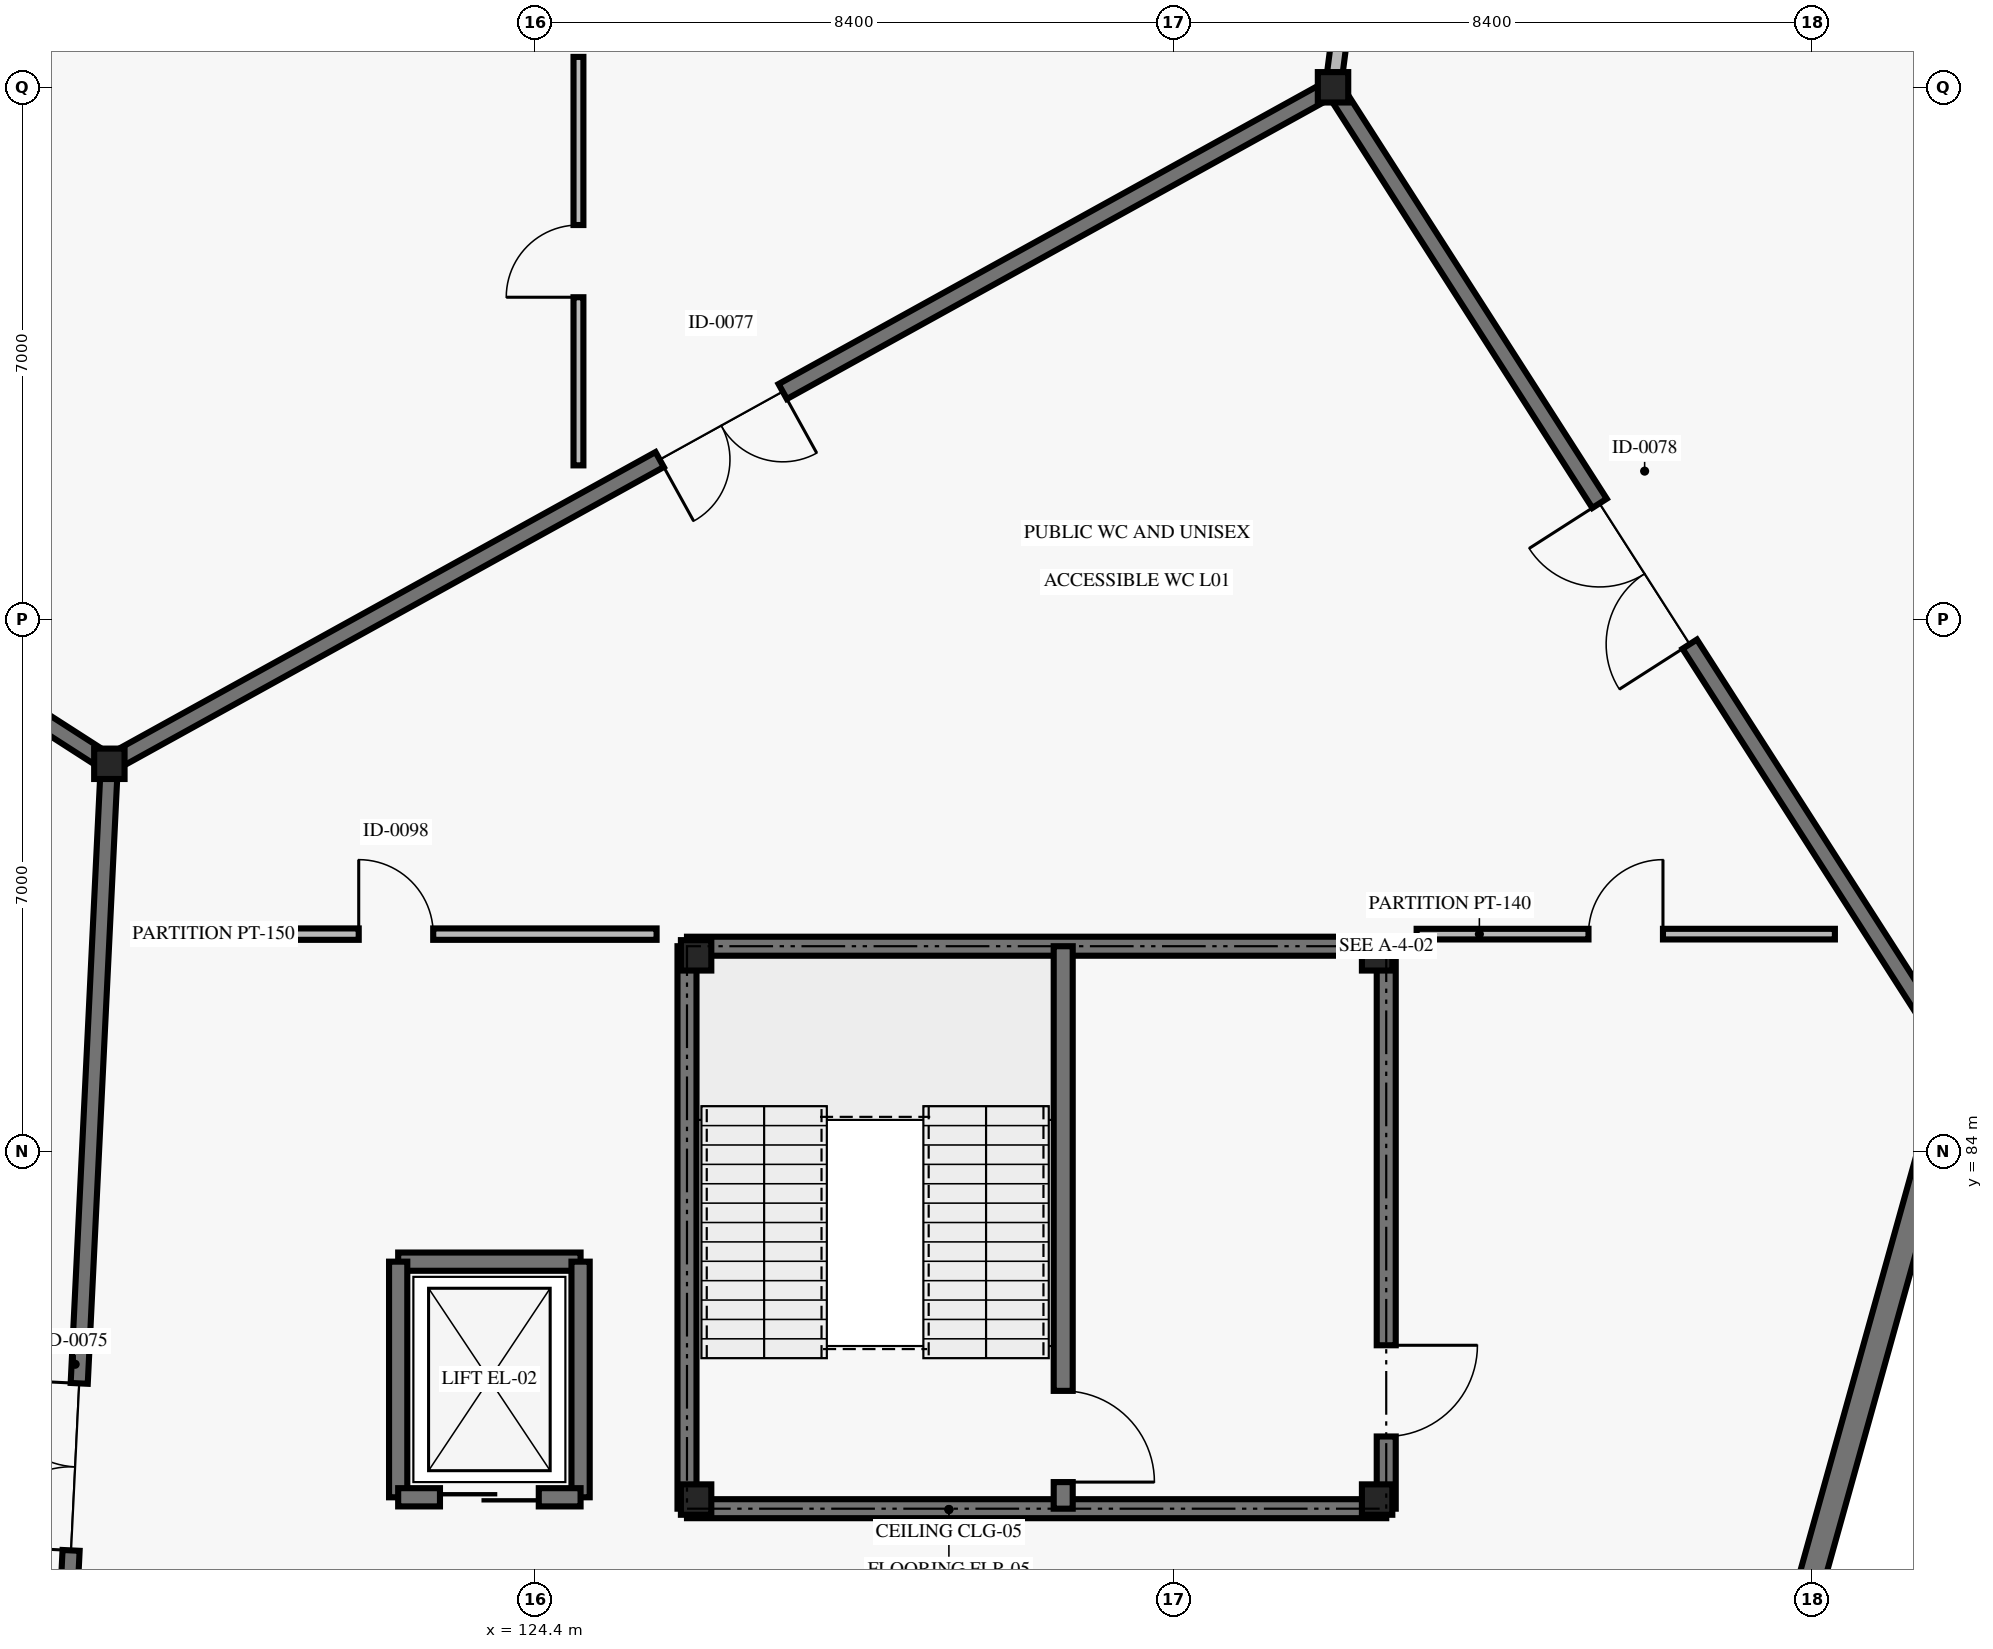
"""IFC4 building model, lengths in metres.
Left out: names, types, materials, properties, quantities, classifications, styles, units other than length and angle.
Written with IfcOpenShell. Run it as: python <this file> out.ifc"""

import sys

from ifc_helpers import new_model, si_unit, direction, frame, frame_2d, origin, origin_2d, place, context, subcontext, project, spatial, rectangle, i_section, extrude, element, fill, save


model = new_model("IFC4")
c1 = context("Model", 3, precision=1e-05, world=origin(), true_north=direction((0.0, 1.0)))
c2 = subcontext(c1, "Body", "Model", "MODEL_VIEW")
j1 = project(units=[si_unit("LENGTHUNIT", "METRE"), si_unit("PLANEANGLEUNIT", "RADIAN")], contexts=[c1])
p1 = place(None, origin())
s1 = spatial("IfcSite", under=j1, at=p1, CompositionType="ELEMENT")
p2 = place(p1, origin())
s2 = spatial("IfcBuilding", under=s1, at=p2, CompositionType="ELEMENT")
p3 = place(p2, frame((0.0, 0.0, 5.4)))
s3 = spatial("IfcBuildingStorey", under=s2, at=p3, CompositionType="ELEMENT", Elevation=5.4)
for number, where, z_axis, x_axis in (
    (1, (118.8, 89.1, 0.0), (0.0, 0.0, 1.0), (1.0, 0.0, 0.0)),
    (2, (134.9, 98.0, 0.0), (0.0, 0.0, 1.0), (1.0, 0.0, 0.0)),
    (3, (126.52, 79.42, 0.0), (0.0, 0.0, 1.0), (1.0, 0.0, 0.0)),
    (4, (135.48, 79.42, 0.0), (0.0, 0.0, 1.0), (1.0, 0.0, 0.0)),
    (5, (135.48, 86.58, 0.0), (0.0, 0.0, 1.0), (1.0, 0.0, 0.0)),
    (6, (126.52, 86.58, 0.0), (0.0, 0.0, 1.0), (1.0, 0.0, 0.0)),
):
    element("IfcColumn", number, at=place(p3, frame(where, z_axis=z_axis, x_axis=x_axis)), inside=s3, PredefinedType="COLUMN", context=c2, shape_type="SweptSolid", body=[
        extrude(i_section(OverallWidth=0.4, OverallDepth=0.4, WebThickness=0.022, FlangeThickness=0.036, at=origin_2d()), origin(), (0.0, 0.0, 1.0), 4.8),
    ])
p4 = place(p3, frame((143.084, 85.142, 0.0), z_axis=(0.0, 0.0, 1.0), x_axis=(-0.268810029922, -0.963193214165, 0.0)))
e7 = element("IfcWall", 7, at=p4, inside=s3, PredefinedType="SOLIDWALL", context=c2, shape_type="SweptSolid", body=[
    extrude(rectangle(XDim=13.333, YDim=0.34, at=frame_2d((6.667, 0.0))), origin(), (0.0, 0.0, 1.0), 3.62),
])
p5 = place(p3, frame((117.9, 70.6, 0.0), z_axis=(0.0, 0.0, 1.0), x_axis=(0.048599072515, 0.998818366947, 0.0)))
e8 = element("IfcWall", 8, at=p5, inside=s3, PredefinedType="SOLIDWALL", context=c2, shape_type="SweptSolid", body=[
    extrude(rectangle(XDim=18.522, YDim=0.225, at=frame_2d((9.261, 0.0))), origin(), (0.0, 0.0, 1.0), 4.02),
])
p6 = place(p5, frame((8.161, 0.0, 0.0)))
e9 = element("IfcOpeningElement", 9, at=p6, cuts=e8, PredefinedType="OPENING", context=c2, shape_type="SweptSolid", body=[
    extrude(rectangle(XDim=2.2, YDim=2.6, at=frame_2d((1.1, 1.3))), frame((0.0, 0.123, 0.0), z_axis=(0.0, -1.0, 0.0), x_axis=(1.0, 0.0, 0.0)), (0.0, 0.0, 1.0), 0.245),
])
p7 = place(p3, frame((118.8, 89.1, 0.0), z_axis=(0.0, 0.0, 1.0), x_axis=(-0.841183241423, 0.540750177392, 0.0)))
e10 = element("IfcWall", 10, at=p7, inside=s3, PredefinedType="SOLIDWALL", context=c2, shape_type="SweptSolid", body=[
    extrude(rectangle(XDim=18.308, YDim=0.225, at=frame_2d((9.154, 0.0))), origin(), (0.0, 0.0, 1.0), 4.02),
])
p8 = place(p7, frame((8.154, 0.0, 0.0)))
e11 = element("IfcOpeningElement", 11, at=p8, cuts=e10, PredefinedType="OPENING", context=c2, shape_type="SweptSolid", body=[
    extrude(rectangle(XDim=2.0, YDim=2.5, at=frame_2d((1.0, 1.25))), frame((0.0, 0.123, 0.0), z_axis=(0.0, -1.0, 0.0), x_axis=(1.0, 0.0, 0.0)), (0.0, 0.0, 1.0), 0.245),
])
p9 = place(p3, frame((134.9, 98.0, 0.0), z_axis=(0.0, 0.0, 1.0), x_axis=(-0.875181353329, -0.483794996652, 0.0)))
e12 = element("IfcWall", 12, at=p9, inside=s3, PredefinedType="SOLIDWALL", context=c2, shape_type="SweptSolid", body=[
    extrude(rectangle(XDim=18.396, YDim=0.225, at=frame_2d((9.198, 0.0))), origin(), (0.0, 0.0, 1.0), 4.02),
])
p10 = place(p9, frame((8.273, 0.0, 0.0)))
e13 = element("IfcOpeningElement", 13, at=p10, cuts=e12, PredefinedType="OPENING", context=c2, shape_type="SweptSolid", body=[
    extrude(rectangle(XDim=1.85, YDim=2.4, at=frame_2d((0.925, 1.2))), frame((0.0, 0.123, 0.0), z_axis=(0.0, -1.0, 0.0), x_axis=(1.0, 0.0, 0.0)), (0.0, 0.0, 1.0), 0.245),
])
p11 = place(p3, frame((143.1, 85.2, 0.0), z_axis=(0.0, 0.0, 1.0), x_axis=(-0.539434641352, 0.842027474439, 0.0)))
e14 = element("IfcWall", 14, at=p11, inside=s3, PredefinedType="SOLIDWALL", context=c2, shape_type="SweptSolid", body=[
    extrude(rectangle(XDim=15.201, YDim=0.225, at=frame_2d((7.601, 0.0))), origin(), (0.0, 0.0, 1.0), 4.02),
])
p12 = place(p11, frame((6.501, 0.0, 0.0)))
e15 = element("IfcOpeningElement", 15, at=p12, cuts=e14, PredefinedType="OPENING", context=c2, shape_type="SweptSolid", body=[
    extrude(rectangle(XDim=2.2, YDim=2.6, at=frame_2d((1.1, 1.3))), frame((0.0, 0.123, 0.0), z_axis=(0.0, -1.0, 0.0), x_axis=(1.0, 0.0, 0.0)), (0.0, 0.0, 1.0), 0.245),
])
p13 = place(p3, frame((134.9, 98.0, 0.0), z_axis=(0.0, 0.0, 1.0), x_axis=(0.127980011854, 0.991776747341, 0.0)))
e16 = element("IfcWall", 16, at=p13, inside=s3, PredefinedType="SOLIDWALL", context=c2, shape_type="SweptSolid", body=[
    extrude(rectangle(XDim=6.251, YDim=0.205, at=frame_2d((3.126, 0.0))), origin(), (0.0, 0.0, 1.0), 3.32),
])
p14 = place(p13, frame((2.551, 0.0, 0.0)))
e17 = element("IfcOpeningElement", 17, at=p14, cuts=e16, PredefinedType="OPENING", context=c2, shape_type="SweptSolid", body=[
    extrude(rectangle(XDim=1.15, YDim=2.2, at=frame_2d((0.575, 1.1))), frame((0.0, 0.113, 0.0), z_axis=(0.0, -1.0, 0.0), x_axis=(1.0, 0.0, 0.0)), (0.0, 0.0, 1.0), 0.225),
])
p15 = place(p3, frame((119.142, 86.859, 0.0), z_axis=(0.0, 0.0, 1.0), x_axis=(1.0, 0.0, 0.0)))
e18 = element("IfcWall", 18, at=p15, inside=s3, PredefinedType="PARTITIONING", context=c2, shape_type="SweptSolid", body=[
    extrude(rectangle(XDim=6.858, YDim=0.15, at=frame_2d((3.429, 0.0))), origin(), (0.0, 0.0, 1.0), 3.32),
])
p16 = place(p15, frame((2.939, 0.0, 0.0)))
e19 = element("IfcOpeningElement", 19, at=p16, cuts=e18, PredefinedType="OPENING", context=c2, shape_type="SweptSolid", body=[
    extrude(rectangle(XDim=0.98, YDim=2.15, at=frame_2d((0.49, 1.075))), frame((0.0, 0.085, 0.0), z_axis=(0.0, -1.0, 0.0), x_axis=(1.0, 0.0, 0.0)), (0.0, 0.0, 1.0), 0.17),
])
p17 = place(p3, frame((136.0, 86.859, 0.0), z_axis=(0.0, 0.0, 1.0), x_axis=(1.0, 0.0, 0.0)))
e20 = element("IfcWall", 20, at=p17, inside=s3, PredefinedType="PARTITIONING", context=c2, shape_type="SweptSolid", body=[
    extrude(rectangle(XDim=5.503, YDim=0.14, at=frame_2d((2.751, 0.0))), origin(), (0.0, 0.0, 1.0), 3.32),
])
p18 = place(p17, frame((2.261, 0.0, 0.0)))
e21 = element("IfcOpeningElement", 21, at=p18, cuts=e20, PredefinedType="OPENING", context=c2, shape_type="SweptSolid", body=[
    extrude(rectangle(XDim=0.98, YDim=2.15, at=frame_2d((0.49, 1.075))), frame((0.0, 0.08, 0.0), z_axis=(0.0, -1.0, 0.0), x_axis=(1.0, 0.0, 0.0)), (0.0, 0.0, 1.0), 0.16),
])
p19 = place(p3, frame((124.972, 93.026, 0.0), z_axis=(0.0, 0.0, 1.0), x_axis=(0.0, 1.0, 0.0)))
e22 = element("IfcWall", 22, at=p19, inside=s3, PredefinedType="PARTITIONING", context=c2, shape_type="SweptSolid", body=[
    extrude(rectangle(XDim=5.374, YDim=0.13, at=frame_2d((2.687, 0.0))), origin(), (0.0, 0.0, 1.0), 3.32),
])
p20 = place(p19, frame((2.212, 0.0, 0.0)))
e23 = element("IfcOpeningElement", 23, at=p20, cuts=e22, PredefinedType="OPENING", context=c2, shape_type="SweptSolid", body=[
    extrude(rectangle(XDim=0.95, YDim=2.15, at=frame_2d((0.475, 1.075))), frame((0.0, 0.075, 0.0), z_axis=(0.0, -1.0, 0.0), x_axis=(1.0, 0.0, 0.0)), (0.0, 0.0, 1.0), 0.15),
])
p21 = place(p3, frame((126.4, 79.3, 0.0), z_axis=(0.0, 0.0, 1.0), x_axis=(0.0, 1.0, 0.0)))
e24 = element("IfcWall", 24, at=p21, inside=s3, PredefinedType="SHEAR", context=c2, shape_type="SweptSolid", body=[
    extrude(rectangle(XDim=7.4, YDim=0.25, at=frame_2d((3.7, 0.0))), origin(), (0.0, 0.0, 1.0), 4.56),
])
for number, where, z_axis, x_axis in (
    (25, (126.4, 86.7, 0.0), (0.0, 0.0, 1.0), (1.0, 0.0, 0.0)),
    (26, (135.6, 79.3, 0.0), (0.0, 0.0, 1.0), (-1.0, 0.0, 0.0)),
):
    element("IfcWall", number, at=place(p3, frame(where, z_axis=z_axis, x_axis=x_axis)), inside=s3, PredefinedType="SHEAR", context=c2, shape_type="SweptSolid", body=[
        extrude(rectangle(XDim=9.2, YDim=0.25, at=frame_2d((4.6, 0.0))), origin(), (0.0, 0.0, 1.0), 4.56),
    ])
p22 = place(p3, frame((135.6, 86.7, 0.0), z_axis=(0.0, 0.0, 1.0), x_axis=(0.0, -1.0, 0.0)))
e27 = element("IfcWall", 27, at=p22, inside=s3, PredefinedType="SHEAR", context=c2, shape_type="SweptSolid", body=[
    extrude(rectangle(XDim=7.4, YDim=0.25, at=frame_2d((3.7, 0.0))), origin(), (0.0, 0.0, 1.0), 4.56),
])
p23 = place(p22, frame((5.25, 0.0, 0.0)))
e28 = element("IfcOpeningElement", 28, at=p23, cuts=e27, PredefinedType="OPENING", context=c2, shape_type="SweptSolid", body=[
    extrude(rectangle(XDim=1.2, YDim=2.2, at=frame_2d((0.6, 1.1))), frame((0.0, 0.135, 0.0), z_axis=(0.0, -1.0, 0.0), x_axis=(1.0, 0.0, 0.0)), (0.0, 0.0, 1.0), 0.27),
])
p24 = place(p3, frame((131.35, 86.7, 0.0), z_axis=(0.0, 0.0, 1.0), x_axis=(0.0, -1.0, 0.0)))
e29 = element("IfcWall", 29, at=p24, inside=s3, PredefinedType="SHEAR", context=c2, shape_type="SweptSolid", body=[
    extrude(rectangle(XDim=7.4, YDim=0.25, at=frame_2d((3.7, 0.0))), origin(), (0.0, 0.0, 1.0), 4.56),
])
p25 = place(p24, frame((5.85, 0.0, 0.0)))
e30 = element("IfcOpeningElement", 30, at=p25, cuts=e29, PredefinedType="OPENING", context=c2, shape_type="SweptSolid", body=[
    extrude(rectangle(XDim=1.2, YDim=2.2, at=frame_2d((0.6, 1.1))), frame((0.0, 0.135, 0.0), z_axis=(0.0, -1.0, 0.0), x_axis=(1.0, 0.0, 0.0)), (0.0, 0.0, 1.0), 0.27),
])
p26 = place(p3, frame((122.6, 82.55, 0.0), z_axis=(0.0, 0.0, 1.0), x_axis=(1.0, 0.0, 0.0)))
e31 = element("IfcWall", 31, at=p26, inside=s3, PredefinedType="SHEAR", context=c2, shape_type="SweptSolid", body=[
    extrude(rectangle(XDim=2.4, YDim=0.24, at=frame_2d((1.2, 0.0))), origin(), (0.0, 0.0, 1.0), 4.56),
])
for number, where, z_axis, x_axis in (
    (32, (125.0, 82.55, 0.0), (0.0, 0.0, 1.0), (0.0, -1.0, 0.0)),
    (33, (122.6, 79.45, 0.0), (0.0, 0.0, 1.0), (0.0, 1.0, 0.0)),
):
    element("IfcWall", number, at=place(p3, frame(where, z_axis=z_axis, x_axis=x_axis)), inside=s3, PredefinedType="SHEAR", context=c2, shape_type="SweptSolid", body=[
        extrude(rectangle(XDim=3.1, YDim=0.24, at=frame_2d((1.55, 0.0))), origin(), (0.0, 0.0, 1.0), 4.56),
    ])
p27 = place(p3, frame((125.0, 79.45, 0.0), z_axis=(0.0, 0.0, 1.0), x_axis=(-1.0, 0.0, 0.0)))
e34 = element("IfcWall", 34, at=p27, inside=s3, PredefinedType="SHEAR", context=c2, shape_type="SweptSolid", body=[
    extrude(rectangle(XDim=2.4, YDim=0.24, at=frame_2d((1.2, 0.0))), origin(), (0.0, 0.0, 1.0), 4.56),
])
p28 = place(p27, frame((0.55, 0.0, 0.0)))
e35 = element("IfcOpeningElement", 35, at=p28, cuts=e34, PredefinedType="OPENING", context=c2, shape_type="SweptSolid", body=[
    extrude(rectangle(XDim=1.3, YDim=2.25, at=frame_2d((0.65, 1.125))), frame((0.0, 0.13, 0.0), z_axis=(0.0, -1.0, 0.0), x_axis=(1.0, 0.0, 0.0)), (0.0, 0.0, 1.0), 0.26),
])
p29 = place(p6, origin())
e36 = element("IfcDoor", 36, at=p29, inside=s3, OperationType="DOUBLE_DOOR_SINGLE_SWING", PredefinedType="DOOR", context=c2, shape_type="SweptSolid", body=[
    extrude(rectangle(XDim=2.2, YDim=2.6, at=frame_2d((1.1, 1.3))), frame((0.0, 0.025, 0.0), z_axis=(0.0, -1.0, 0.0), x_axis=(1.0, 0.0, 0.0)), (0.0, 0.0, 1.0), 0.05),
])
fill(e9, e36)
p30 = place(p10, origin())
e37 = element("IfcDoor", 37, at=p30, inside=s3, OperationType="DOUBLE_DOOR_SINGLE_SWING", PredefinedType="DOOR", context=c2, shape_type="SweptSolid", body=[
    extrude(rectangle(XDim=1.85, YDim=2.4, at=frame_2d((0.925, 1.2))), frame((0.0, 0.025, 0.0), z_axis=(0.0, -1.0, 0.0), x_axis=(1.0, 0.0, 0.0)), (0.0, 0.0, 1.0), 0.05),
])
fill(e13, e37)
p31 = place(p12, origin())
e38 = element("IfcDoor", 38, at=p31, inside=s3, OperationType="DOUBLE_DOOR_SINGLE_SWING", PredefinedType="DOOR", context=c2, shape_type="SweptSolid", body=[
    extrude(rectangle(XDim=2.2, YDim=2.6, at=frame_2d((1.1, 1.3))), frame((0.0, 0.025, 0.0), z_axis=(0.0, -1.0, 0.0), x_axis=(1.0, 0.0, 0.0)), (0.0, 0.0, 1.0), 0.05),
])
fill(e15, e38)
p32 = place(p16, origin())
e39 = element("IfcDoor", 39, at=p32, inside=s3, OperationType="SINGLE_SWING_LEFT", PredefinedType="DOOR", context=c2, shape_type="SweptSolid", body=[
    extrude(rectangle(XDim=0.98, YDim=2.15, at=frame_2d((0.49, 1.075))), frame((0.0, 0.025, 0.0), z_axis=(0.0, -1.0, 0.0), x_axis=(1.0, 0.0, 0.0)), (0.0, 0.0, 1.0), 0.05),
])
fill(e19, e39)
p33 = place(p18, origin())
e40 = element("IfcDoor", 40, at=p33, inside=s3, OperationType="SINGLE_SWING_RIGHT", PredefinedType="DOOR", context=c2, shape_type="SweptSolid", body=[
    extrude(rectangle(XDim=0.98, YDim=2.15, at=frame_2d((0.49, 1.075))), frame((0.0, 0.025, 0.0), z_axis=(0.0, -1.0, 0.0), x_axis=(1.0, 0.0, 0.0)), (0.0, 0.0, 1.0), 0.05),
])
fill(e21, e40)
p34 = place(p20, origin())
e41 = element("IfcDoor", 41, at=p34, inside=s3, OperationType="SINGLE_SWING_LEFT", PredefinedType="DOOR", context=c2, shape_type="SweptSolid", body=[
    extrude(rectangle(XDim=0.95, YDim=2.15, at=frame_2d((0.475, 1.075))), frame((0.0, 0.025, 0.0), z_axis=(0.0, -1.0, 0.0), x_axis=(1.0, 0.0, 0.0)), (0.0, 0.0, 1.0), 0.05),
])
fill(e23, e41)
p35 = place(p23, origin())
e42 = element("IfcDoor", 42, at=p35, inside=s3, OperationType="SINGLE_SWING_LEFT", PredefinedType="DOOR", context=c2, shape_type="SweptSolid", body=[
    extrude(rectangle(XDim=1.2, YDim=2.2, at=frame_2d((0.6, 1.1))), frame((0.0, 0.025, 0.0), z_axis=(0.0, -1.0, 0.0), x_axis=(1.0, 0.0, 0.0)), (0.0, 0.0, 1.0), 0.05),
])
fill(e28, e42)
p36 = place(p25, origin())
e43 = element("IfcDoor", 43, at=p36, inside=s3, OperationType="SINGLE_SWING_RIGHT", PredefinedType="DOOR", context=c2, shape_type="SweptSolid", body=[
    extrude(rectangle(XDim=1.2, YDim=2.2, at=frame_2d((0.6, 1.1))), frame((0.0, 0.025, 0.0), z_axis=(0.0, -1.0, 0.0), x_axis=(1.0, 0.0, 0.0)), (0.0, 0.0, 1.0), 0.05),
])
fill(e30, e43)
p37 = place(p28, origin())
e44 = element("IfcDoor", 44, at=p37, inside=s3, OperationType="SLIDING_TO_LEFT", PredefinedType="DOOR", context=c2, shape_type="SweptSolid", body=[
    extrude(rectangle(XDim=1.3, YDim=2.25, at=frame_2d((0.65, 1.125))), frame((0.0, 0.025, 0.0), z_axis=(0.0, -1.0, 0.0), x_axis=(1.0, 0.0, 0.0)), (0.0, 0.0, 1.0), 0.05),
])
fill(e35, e44)
save(model, sys.argv[1])
